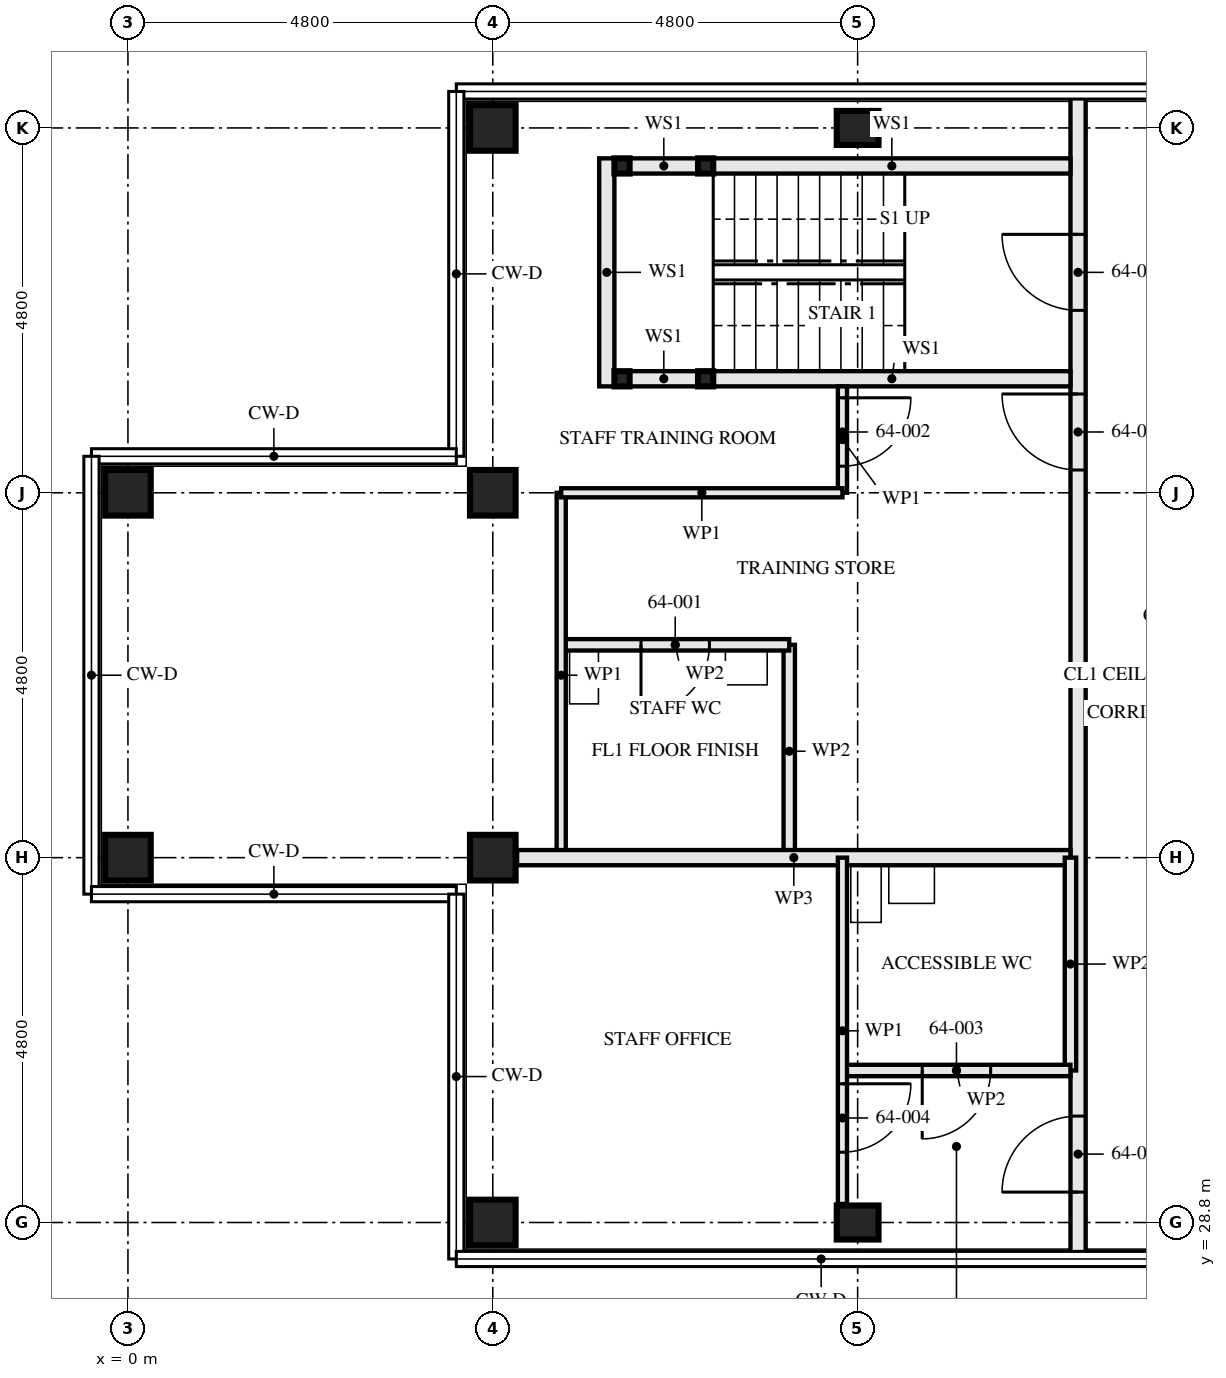
"""IFC4 building model, lengths in metres.
Left out: names, types, materials, properties, quantities, classifications, styles, units other than length and angle.
Written with IfcOpenShell. Run it as: python <this file> out.ifc"""

import sys

from ifc_helpers import new_model, si_unit, direction, frame, frame_2d, origin, origin_2d, place, context, subcontext, project, spatial, rectangle, hollow_rectangle, i_section, extrude, element, fill, save


model = new_model("IFC4")
c1 = context("Model", 3, precision=1e-05, world=origin(), true_north=direction((0.0, 1.0)))
c2 = subcontext(c1, "Body", "Model", "MODEL_VIEW")
j1 = project(units=[si_unit("LENGTHUNIT", "METRE"), si_unit("PLANEANGLEUNIT", "RADIAN")], contexts=[c1])
p1 = place(None, origin())
s1 = spatial("IfcSite", under=j1, at=p1, CompositionType="ELEMENT")
p2 = place(p1, origin())
s2 = spatial("IfcBuilding", under=s1, at=p2, CompositionType="ELEMENT")
p3 = place(p2, frame((0.0, 0.0, 233.0)))
s3 = spatial("IfcBuildingStorey", under=s2, at=p3, CompositionType="ELEMENT", Elevation=233.0)
for number, where, z_axis, x_axis in (
    (1, (0.0, 33.6, 0.0), (0.0, 0.0, 1.0), (0.0, 1.0, 0.0)),
    (2, (0.0, 38.4, 0.0), (0.0, 0.0, 1.0), (0.0, 1.0, 0.0)),
    (3, (4.8, 28.8, 0.0), (0.0, 0.0, 1.0), (0.0, 1.0, 0.0)),
    (4, (4.8, 33.6, 0.0), (0.0, 0.0, 1.0), (0.0, 1.0, 0.0)),
    (5, (4.8, 38.4, 0.0), (0.0, 0.0, 1.0), (0.0, 1.0, 0.0)),
    (6, (4.8, 43.2, 0.0), (0.0, 0.0, 1.0), (0.0, 1.0, 0.0)),
):
    element("IfcColumn", number, at=place(p3, frame(where, z_axis=z_axis, x_axis=x_axis)), inside=s3, PredefinedType="COLUMN", context=c2, shape_type="SweptSolid", body=[
        extrude(hollow_rectangle(XDim=0.6, YDim=0.6, WallThickness=0.05, at=origin_2d()), origin(), (0.0, 0.0, 1.0), 3.5),
    ])
for number, where, z_axis, x_axis in (
    (7, (9.6, 28.8, 0.0), (0.0, 0.0, 1.0), (0.0, 1.0, 0.0)),
    (8, (9.6, 43.2, 0.0), (0.0, 0.0, 1.0), (0.0, 1.0, 0.0)),
):
    element("IfcColumn", number, at=place(p3, frame(where, z_axis=z_axis, x_axis=x_axis)), inside=s3, PredefinedType="COLUMN", context=c2, shape_type="SweptSolid", body=[
        extrude(i_section(OverallWidth=0.448, OverallDepth=0.55, WebThickness=0.072, FlangeThickness=0.115, FilletRadius=0.015, at=origin_2d()), origin(), (0.0, 0.0, 1.0), 3.5),
    ])
for number, where, z_axis, x_axis in (
    (9, (6.5, 42.7, 0.0), (0.0, 0.0, 1.0), (1.0, 0.0, 0.0)),
    (10, (6.5, 39.9, 0.0), (0.0, 0.0, 1.0), (1.0, 0.0, 0.0)),
    (11, (7.6, 42.7, 0.0), (0.0, 0.0, 1.0), (1.0, 0.0, 0.0)),
    (12, (7.6, 39.9, 0.0), (0.0, 0.0, 1.0), (1.0, 0.0, 0.0)),
):
    element("IfcColumn", number, at=place(p3, frame(where, z_axis=z_axis, x_axis=x_axis)), inside=s3, PredefinedType="COLUMN", context=c2, shape_type="SweptSolid", body=[
        extrude(hollow_rectangle(XDim=0.2, YDim=0.2, WallThickness=0.008, at=origin_2d()), origin(), (0.0, 0.0, 1.0), 3.33),
    ])
p4 = place(p3, frame((6.6, 42.7, 0.0), z_axis=(0.0, 0.0, 1.0), x_axis=(1.0, 0.0, 0.0)))
e13 = element("IfcWall", 13, at=p4, inside=s3, PredefinedType="SOLIDWALL", context=c2, shape_type="SweptSolid", body=[
    extrude(rectangle(XDim=0.9, YDim=0.2, at=frame_2d((0.45, 0.0))), origin(), (0.0, 0.0, 1.0), 2.99),
])
p5 = place(p3, frame((7.7, 42.7, 0.0), z_axis=(0.0, 0.0, 1.0), x_axis=(1.0, 0.0, 0.0)))
e14 = element("IfcWall", 14, at=p5, inside=s3, PredefinedType="SOLIDWALL", context=c2, shape_type="SweptSolid", body=[
    extrude(rectangle(XDim=4.7, YDim=0.2, at=frame_2d((2.35, 0.0))), origin(), (0.0, 0.0, 1.0), 2.99),
])
p6 = place(p3, frame((6.6, 39.9, 0.0), z_axis=(0.0, 0.0, 1.0), x_axis=(1.0, 0.0, 0.0)))
e15 = element("IfcWall", 15, at=p6, inside=s3, PredefinedType="SOLIDWALL", context=c2, shape_type="SweptSolid", body=[
    extrude(rectangle(XDim=0.9, YDim=0.2, at=frame_2d((0.45, 0.0))), origin(), (0.0, 0.0, 1.0), 2.99),
])
p7 = place(p3, frame((7.7, 39.9, 0.0), z_axis=(0.0, 0.0, 1.0), x_axis=(1.0, 0.0, 0.0)))
e16 = element("IfcWall", 16, at=p7, inside=s3, PredefinedType="SOLIDWALL", context=c2, shape_type="SweptSolid", body=[
    extrude(rectangle(XDim=4.7, YDim=0.2, at=frame_2d((2.35, 0.0))), origin(), (0.0, 0.0, 1.0), 2.99),
])
p8 = place(p3, frame((6.3, 42.8, 0.0), z_axis=(0.0, 0.0, 1.0), x_axis=(0.0, -1.0, 0.0)))
e17 = element("IfcWall", 17, at=p8, inside=s3, PredefinedType="SOLIDWALL", context=c2, shape_type="SweptSolid", body=[
    extrude(rectangle(XDim=3.0, YDim=0.2, at=frame_2d((1.5, 0.0))), origin(), (0.0, 0.0, 1.0), 3.33),
])
p9 = place(p3, frame((5.7, 36.4, 0.0), z_axis=(0.0, 0.0, 1.0), x_axis=(1.0, 0.0, 0.0)))
e18 = element("IfcWall", 18, at=p9, inside=s3, PredefinedType="PARTITIONING", context=c2, shape_type="SweptSolid", body=[
    extrude(rectangle(XDim=3.0, YDim=0.15, at=frame_2d((1.5, 0.0))), origin(), (0.0, 0.0, 1.0), 3.33),
])
p10 = place(p9, frame((1.05, 0.0, 0.0)))
e19 = element("IfcOpeningElement", 19, at=p10, cuts=e18, PredefinedType="OPENING", context=c2, shape_type="SweptSolid", body=[
    extrude(rectangle(XDim=0.9, YDim=2.1, at=frame_2d((0.45, 1.05))), frame((0.0, 0.085, 0.0), z_axis=(0.0, -1.0, 0.0), x_axis=(1.0, 0.0, 0.0)), (0.0, 0.0, 1.0), 0.171),
])
p11 = place(p3, frame((8.7, 36.4, 0.0), z_axis=(0.0, 0.0, 1.0), x_axis=(0.0, -1.0, 0.0)))
e20 = element("IfcWall", 20, at=p11, inside=s3, PredefinedType="PARTITIONING", context=c2, shape_type="SweptSolid", body=[
    extrude(rectangle(XDim=2.8, YDim=0.15, at=frame_2d((1.4, 0.0))), origin(), (0.0, 0.0, 1.0), 3.33),
])
p12 = place(p3, frame((9.4, 39.8, 0.0), z_axis=(0.0, 0.0, 1.0), x_axis=(0.0, -1.0, 0.0)))
e21 = element("IfcWall", 21, at=p12, inside=s3, PredefinedType="PARTITIONING", context=c2, shape_type="SweptSolid", body=[
    extrude(rectangle(XDim=1.4, YDim=0.12, at=frame_2d((0.7, 0.0))), origin(), (0.0, 0.0, 1.0), 3.33),
])
p13 = place(p12, frame((0.15, 0.0, 0.0)))
e22 = element("IfcOpeningElement", 22, at=p13, cuts=e21, PredefinedType="OPENING", context=c2, shape_type="SweptSolid", body=[
    extrude(rectangle(XDim=0.9, YDim=2.1, at=frame_2d((0.45, 1.05))), frame((0.0, 0.071, 0.0), z_axis=(0.0, -1.0, 0.0), x_axis=(1.0, 0.0, 0.0)), (0.0, 0.0, 1.0), 0.141),
])
p14 = place(p3, frame((5.7, 38.4, 0.0), z_axis=(0.0, 0.0, 1.0), x_axis=(0.0, -1.0, 0.0)))
e23 = element("IfcWall", 23, at=p14, inside=s3, PredefinedType="PARTITIONING", context=c2, shape_type="SweptSolid", body=[
    extrude(rectangle(XDim=4.8, YDim=0.12, at=frame_2d((2.4, 0.0))), origin(), (0.0, 0.0, 1.0), 3.33),
])
p15 = place(p3, frame((5.7, 38.4, 0.0), z_axis=(0.0, 0.0, 1.0), x_axis=(1.0, 0.0, 0.0)))
e24 = element("IfcWall", 24, at=p15, inside=s3, PredefinedType="PARTITIONING", context=c2, shape_type="SweptSolid", body=[
    extrude(rectangle(XDim=3.7, YDim=0.12, at=frame_2d((1.85, 0.0))), origin(), (0.0, 0.0, 1.0), 2.55),
])
p16 = place(p3, frame((5.12, 33.6, 0.0), z_axis=(0.0, 0.0, 1.0), x_axis=(1.0, 0.0, 0.0)))
e25 = element("IfcWall", 25, at=p16, inside=s3, PredefinedType="PARTITIONING", context=c2, shape_type="SweptSolid", body=[
    extrude(rectangle(XDim=7.28, YDim=0.2, at=frame_2d((3.64, 0.0))), origin(), (0.0, 0.0, 1.0), 2.55),
])
p17 = place(p3, frame((9.4, 30.8, 0.0), z_axis=(0.0, 0.0, 1.0), x_axis=(1.0, 0.0, 0.0)))
e26 = element("IfcWall", 26, at=p17, inside=s3, PredefinedType="PARTITIONING", context=c2, shape_type="SweptSolid", body=[
    extrude(rectangle(XDim=3.0, YDim=0.15, at=frame_2d((1.5, 0.0))), origin(), (0.0, 0.0, 1.0), 3.33),
])
p18 = place(p17, frame((1.05, 0.0, 0.0)))
e27 = element("IfcOpeningElement", 27, at=p18, cuts=e26, PredefinedType="OPENING", context=c2, shape_type="SweptSolid", body=[
    extrude(rectangle(XDim=0.9, YDim=2.1, at=frame_2d((0.45, 1.05))), frame((0.0, 0.085, 0.0), z_axis=(0.0, -1.0, 0.0), x_axis=(1.0, 0.0, 0.0)), (0.0, 0.0, 1.0), 0.171),
])
p19 = place(p3, frame((12.4, 33.6, 0.0), z_axis=(0.0, 0.0, 1.0), x_axis=(0.0, -1.0, 0.0)))
e28 = element("IfcWall", 28, at=p19, inside=s3, PredefinedType="PARTITIONING", context=c2, shape_type="SweptSolid", body=[
    extrude(rectangle(XDim=2.8, YDim=0.15, at=frame_2d((1.4, 0.0))), origin(), (0.0, 0.0, 1.0), 3.33),
])
p20 = place(p3, frame((9.4, 33.6, 0.0), z_axis=(0.0, 0.0, 1.0), x_axis=(0.0, -1.0, 0.0)))
e29 = element("IfcWall", 29, at=p20, inside=s3, PredefinedType="PARTITIONING", context=c2, shape_type="SweptSolid", body=[
    extrude(rectangle(XDim=4.556, YDim=0.12, at=frame_2d((2.278, 0.0))), origin(), (0.0, 0.0, 1.0), 3.33),
])
p21 = place(p20, frame((2.975, 0.0, 0.0)))
e30 = element("IfcOpeningElement", 30, at=p21, cuts=e29, PredefinedType="OPENING", context=c2, shape_type="SweptSolid", body=[
    extrude(rectangle(XDim=0.9, YDim=2.1, at=frame_2d((0.45, 1.05))), frame((0.0, 0.071, 0.0), z_axis=(0.0, -1.0, 0.0), x_axis=(1.0, 0.0, 0.0)), (0.0, 0.0, 1.0), 0.141),
])
p22 = place(p3, frame((12.5, 43.655, 0.0), z_axis=(0.0, 0.0, 1.0), x_axis=(0.0, -1.0, 0.0)))
e31 = element("IfcWall", 31, at=p22, inside=s3, PredefinedType="PARTITIONING", context=c2, shape_type="SweptSolid", body=[
    extrude(rectangle(XDim=15.31, YDim=0.2, at=frame_2d((7.655, 0.0))), origin(), (0.0, 0.0, 1.0), 2.32),
])
p23 = place(p22, frame((1.855, 0.0, 0.0)))
e32 = element("IfcOpeningElement", 32, at=p23, cuts=e31, PredefinedType="OPENING", context=c2, shape_type="SweptSolid", body=[
    extrude(rectangle(XDim=1.0, YDim=2.1, at=frame_2d((0.5, 1.05))), frame((0.0, 0.111, 0.0), z_axis=(0.0, -1.0, 0.0), x_axis=(1.0, 0.0, 0.0)), (0.0, 0.0, 1.0), 0.221),
])
p24 = place(p22, frame((3.955, 0.0, 0.0)))
e33 = element("IfcOpeningElement", 33, at=p24, cuts=e31, PredefinedType="OPENING", context=c2, shape_type="SweptSolid", body=[
    extrude(rectangle(XDim=1.0, YDim=2.1, at=frame_2d((0.5, 1.05))), frame((0.0, 0.111, 0.0), z_axis=(0.0, -1.0, 0.0), x_axis=(1.0, 0.0, 0.0)), (0.0, 0.0, 1.0), 0.221),
])
p25 = place(p22, frame((13.455, 0.0, 0.0)))
e34 = element("IfcOpeningElement", 34, at=p25, cuts=e31, PredefinedType="OPENING", context=c2, shape_type="SweptSolid", body=[
    extrude(rectangle(XDim=1.0, YDim=2.1, at=frame_2d((0.5, 1.05))), frame((0.0, 0.111, 0.0), z_axis=(0.0, -1.0, 0.0), x_axis=(1.0, 0.0, 0.0)), (0.0, 0.0, 1.0), 0.221),
])
p26 = place(p10, frame((0.9, 0.0, 0.0), z_axis=(0.0, 0.0, 1.0), x_axis=(-1.0, 0.0, 0.0)))
e35 = element("IfcDoor", 35, at=p26, inside=s3, OperationType="SINGLE_SWING_LEFT", PredefinedType="DOOR", context=c2, shape_type="SweptSolid", body=[
    extrude(rectangle(XDim=0.9, YDim=2.1, at=frame_2d((0.45, 1.05))), frame((0.0, 0.022, 0.0), z_axis=(0.0, -1.0, 0.0), x_axis=(1.0, 0.0, 0.0)), (0.0, 0.0, 1.0), 0.044),
])
fill(e19, e35)
p27 = place(p13, origin())
e36 = element("IfcDoor", 36, at=p27, inside=s3, OperationType="SINGLE_SWING_RIGHT", PredefinedType="DOOR", context=c2, shape_type="SweptSolid", body=[
    extrude(rectangle(XDim=0.9, YDim=2.1, at=frame_2d((0.45, 1.05))), frame((0.0, 0.022, 0.0), z_axis=(0.0, -1.0, 0.0), x_axis=(1.0, 0.0, 0.0)), (0.0, 0.0, 1.0), 0.044),
])
fill(e22, e36)
p28 = place(p18, frame((0.9, 0.0, 0.0), z_axis=(0.0, 0.0, 1.0), x_axis=(-1.0, 0.0, 0.0)))
e37 = element("IfcDoor", 37, at=p28, inside=s3, OperationType="SINGLE_SWING_LEFT", PredefinedType="DOOR", context=c2, shape_type="SweptSolid", body=[
    extrude(rectangle(XDim=0.9, YDim=2.1, at=frame_2d((0.45, 1.05))), frame((0.0, 0.022, 0.0), z_axis=(0.0, -1.0, 0.0), x_axis=(1.0, 0.0, 0.0)), (0.0, 0.0, 1.0), 0.044),
])
fill(e27, e37)
p29 = place(p21, origin())
e38 = element("IfcDoor", 38, at=p29, inside=s3, OperationType="SINGLE_SWING_RIGHT", PredefinedType="DOOR", context=c2, shape_type="SweptSolid", body=[
    extrude(rectangle(XDim=0.9, YDim=2.1, at=frame_2d((0.45, 1.05))), frame((0.0, 0.022, 0.0), z_axis=(0.0, -1.0, 0.0), x_axis=(1.0, 0.0, 0.0)), (0.0, 0.0, 1.0), 0.044),
])
fill(e30, e38)
p30 = place(p23, frame((1.0, 0.0, 0.0), z_axis=(0.0, 0.0, 1.0), x_axis=(-1.0, 0.0, 0.0)))
e39 = element("IfcDoor", 39, at=p30, inside=s3, OperationType="SINGLE_SWING_LEFT", PredefinedType="DOOR", context=c2, shape_type="SweptSolid", body=[
    extrude(rectangle(XDim=1.0, YDim=2.1, at=frame_2d((0.5, 1.05))), frame((0.0, 0.032, 0.0), z_axis=(0.0, -1.0, 0.0), x_axis=(1.0, 0.0, 0.0)), (0.0, 0.0, 1.0), 0.064),
])
fill(e32, e39)
p31 = place(p24, frame((1.0, 0.0, 0.0), z_axis=(0.0, 0.0, 1.0), x_axis=(-1.0, 0.0, 0.0)))
e40 = element("IfcDoor", 40, at=p31, inside=s3, OperationType="SINGLE_SWING_LEFT", PredefinedType="DOOR", context=c2, shape_type="SweptSolid", body=[
    extrude(rectangle(XDim=1.0, YDim=2.1, at=frame_2d((0.5, 1.05))), frame((0.0, 0.027, 0.0), z_axis=(0.0, -1.0, 0.0), x_axis=(1.0, 0.0, 0.0)), (0.0, 0.0, 1.0), 0.054),
])
fill(e33, e40)
p32 = place(p25, frame((1.0, 0.0, 0.0), z_axis=(0.0, 0.0, 1.0), x_axis=(-1.0, 0.0, 0.0)))
e41 = element("IfcDoor", 41, at=p32, inside=s3, OperationType="SINGLE_SWING_RIGHT", PredefinedType="DOOR", context=c2, shape_type="SweptSolid", body=[
    extrude(rectangle(XDim=1.0, YDim=2.1, at=frame_2d((0.5, 1.05))), frame((0.0, 0.027, 0.0), z_axis=(0.0, -1.0, 0.0), x_axis=(1.0, 0.0, 0.0)), (0.0, 0.0, 1.0), 0.054),
])
fill(e34, e41)
save(model, sys.argv[1])
